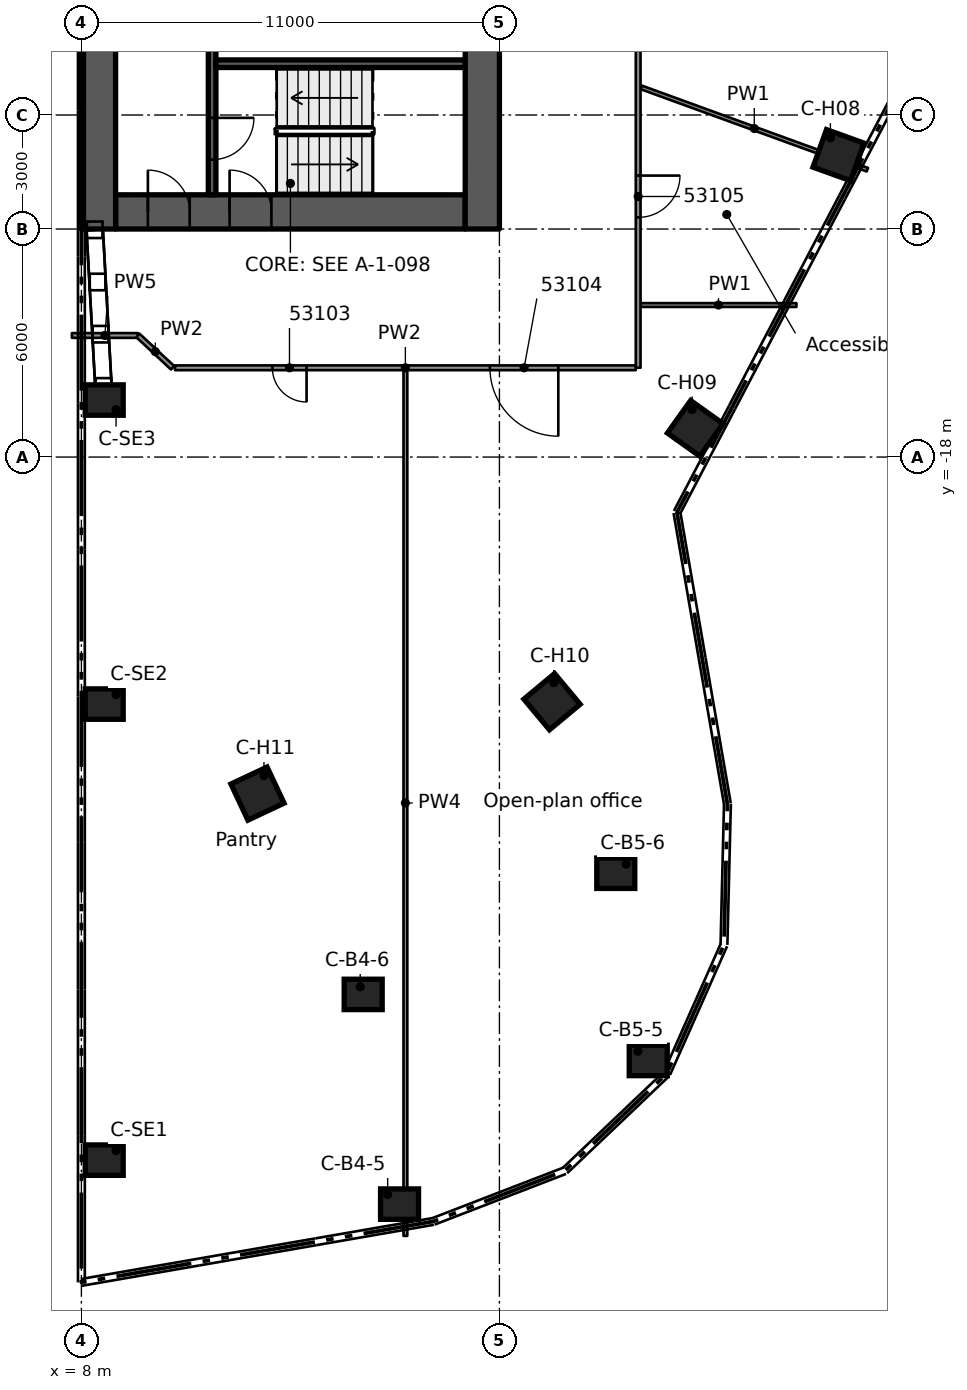
"""IFC4 building model, lengths in metres.
Left out: names, types, materials, properties, quantities, classifications, styles, units other than length and angle.
Written with IfcOpenShell. Run it as: python <this file> out.ifc"""

import sys

from ifc_helpers import new_model, si_unit, direction, frame, frame_2d, origin, origin_2d, place, context, subcontext, project, spatial, rectangle, extrude, element, fill, save


model = new_model("IFC4")
c1 = context("Model", 3, precision=1e-05, world=origin(), true_north=direction((0.0, 1.0)))
c2 = subcontext(c1, "Body", "Model", "MODEL_VIEW")
j1 = project(units=[si_unit("LENGTHUNIT", "METRE"), si_unit("PLANEANGLEUNIT", "RADIAN")], contexts=[c1])
p1 = place(None, origin())
s1 = spatial("IfcSite", under=j1, at=p1, CompositionType="ELEMENT")
p2 = place(p1, origin())
s2 = spatial("IfcBuilding", under=s1, at=p2, CompositionType="ELEMENT")
p3 = place(p2, frame((0.0, 0.0, 267.5)))
s3 = spatial("IfcBuildingStorey", under=s2, at=p3, CompositionType="ELEMENT", Elevation=267.5)
p4 = place(p3, frame((8.9, -11.55, 0.0), z_axis=(0.0, 0.0, 1.0), x_axis=(1.0, 0.0, 0.0)))
e1 = element("IfcWall", 1, at=p4, inside=s3, PredefinedType="SHEAR", context=c2, shape_type="SweptSolid", body=[
    extrude(rectangle(XDim=9.2, YDim=0.9, at=frame_2d((4.6, 0.0))), origin(), (0.0, 0.0, 1.0), 3.5),
])
p5 = place(p4, frame((0.85, 0.0, 0.0)))
e2 = element("IfcOpeningElement", 2, at=p5, cuts=e1, PredefinedType="OPENING", context=c2, shape_type="SweptSolid", body=[
    extrude(rectangle(XDim=1.1, YDim=2.1, at=frame_2d((0.55, 1.05))), frame((0.0, 0.46, 0.0), z_axis=(0.0, -1.0, 0.0), x_axis=(1.0, 0.0, 0.0)), (0.0, 0.0, 1.0), 0.92),
])
p6 = place(p4, frame((3.0, 0.0, 0.0)))
e3 = element("IfcOpeningElement", 3, at=p6, cuts=e1, PredefinedType="OPENING", context=c2, shape_type="SweptSolid", body=[
    extrude(rectangle(XDim=1.1, YDim=2.1, at=frame_2d((0.55, 1.05))), frame((0.0, 0.46, 0.0), z_axis=(0.0, -1.0, 0.0), x_axis=(1.0, 0.0, 0.0)), (0.0, 0.0, 1.0), 0.92),
])
p7 = place(p3, frame((8.45, -12.0, 0.0), z_axis=(0.0, 0.0, 1.0), x_axis=(0.0, 1.0, 0.0)))
e4 = element("IfcWall", 4, at=p7, inside=s3, PredefinedType="SHEAR", context=c2, shape_type="SweptSolid", body=[
    extrude(rectangle(XDim=24.0, YDim=0.9, at=frame_2d((12.0, 0.0))), origin(), (0.0, 0.0, 1.0), 3.5),
])
p8 = place(p3, frame((18.55, -12.0, 0.0), z_axis=(0.0, 0.0, 1.0), x_axis=(0.0, 1.0, 0.0)))
e5 = element("IfcWall", 5, at=p8, inside=s3, PredefinedType="SHEAR", context=c2, shape_type="SweptSolid", body=[
    extrude(rectangle(XDim=24.0, YDim=0.9, at=frame_2d((12.0, 0.0))), origin(), (0.0, 0.0, 1.0), 3.5),
])
p9 = place(p8, frame((12.1, 0.0, 0.0)))
e6 = element("IfcOpeningElement", 6, at=p9, cuts=e5, PredefinedType="OPENING", context=c2, shape_type="SweptSolid", body=[
    extrude(rectangle(XDim=1.8, YDim=2.1, at=frame_2d((0.9, 1.05))), frame((0.0, 0.46, 0.0), z_axis=(0.0, -1.0, 0.0), x_axis=(1.0, 0.0, 0.0)), (0.0, 0.0, 1.0), 0.92),
])
for number, where, z_axis, x_axis in (
    (7, (16.372, -37.657, 0.0), (0.0, 0.0, 1.0), (1.0, 0.0, 0.0)),
    (8, (15.415, -32.139, 0.0), (0.0, 0.0, 1.0), (1.0, 0.0, 0.0)),
    (9, (22.916, -33.877, 0.0), (0.0, 0.0, 1.0), (1.0, 0.0, 0.0)),
    (10, (22.062, -28.951, 0.0), (0.0, 0.0, 1.0), (1.0, 0.0, 0.0)),
):
    element("IfcColumn", number, at=place(p3, frame(where, z_axis=z_axis, x_axis=x_axis)), inside=s3, PredefinedType="COLUMN", context=c2, shape_type="SweptSolid", body=[
        extrude(rectangle(XDim=1.0, YDim=0.8, at=origin_2d()), origin(), (0.0, 0.0, 1.0), 3.5),
    ])
for number, where, z_axis, x_axis in (
    (11, (27.923, -10.056, 0.0), (0.0, 0.0, 1.0), (0.941, -0.339, 0.0)),
    (12, (24.154, -17.246, 0.0), (0.0, 0.0, 1.0), (0.814, -0.581, 0.0)),
    (13, (20.384, -24.437, 0.0), (0.0, 0.0, 1.0), (0.641, -0.768, 0.0)),
    (14, (12.634, -26.855, 0.0), (0.0, 0.0, 1.0), (0.426, -0.905, 0.0)),
):
    element("IfcColumn", number, at=place(p3, frame(where, z_axis=z_axis, x_axis=x_axis)), inside=s3, PredefinedType="COLUMN", context=c2, shape_type="SweptSolid", body=[
        extrude(rectangle(XDim=1.05, YDim=1.05, at=origin_2d()), origin(), (0.0, 0.0, 1.0), 3.5),
    ])
for number, where, z_axis, x_axis in (
    (15, (8.6, -36.5, 0.0), (0.0, 0.0, 1.0), (1.0, 0.0, 0.0)),
    (16, (8.6, -24.5, 0.0), (0.0, 0.0, 1.0), (1.0, 0.0, 0.0)),
    (17, (8.6, -16.5, 0.0), (0.0, 0.0, 1.0), (1.0, 0.0, 0.0)),
):
    element("IfcColumn", number, at=place(p3, frame(where, z_axis=z_axis, x_axis=x_axis)), inside=s3, PredefinedType="COLUMN", context=c2, shape_type="SweptSolid", body=[
        extrude(rectangle(XDim=1.0, YDim=0.8, at=origin_2d()), origin(), (0.0, 0.0, 1.0), 3.5),
    ])
p10 = place(p3, frame((11.44, -6.975, 0.0), z_axis=(0.0, 0.0, 1.0), x_axis=(0.0, -1.0, 0.0)))
e18 = element("IfcWall", 18, at=p10, inside=s3, PredefinedType="SOLIDWALL", context=c2, shape_type="SweptSolid", body=[
    extrude(rectangle(XDim=4.125, YDim=0.2, at=frame_2d((2.062, 0.0))), origin(), (0.0, 0.0, 1.0), 3.05),
])
p11 = place(p10, frame((2.1, 0.0, 0.0)))
e19 = element("IfcOpeningElement", 19, at=p11, cuts=e18, PredefinedType="OPENING", context=c2, shape_type="SweptSolid", body=[
    extrude(rectangle(XDim=1.1, YDim=2.1, at=frame_2d((0.55, 1.05))), frame((0.0, 0.11, 0.0), z_axis=(0.0, -1.0, 0.0), x_axis=(1.0, 0.0, 0.0)), (0.0, 0.0, 1.0), 0.22),
])
p12 = place(p3, frame((11.54, -7.65, 0.0), z_axis=(0.0, 0.0, 1.0), x_axis=(1.0, 0.0, 0.0)))
e20 = element("IfcWall", 20, at=p12, inside=s3, PredefinedType="SOLIDWALL", context=c2, shape_type="SweptSolid", body=[
    extrude(rectangle(XDim=6.56, YDim=0.2, at=frame_2d((3.28, 0.0))), origin(), (0.0, 0.0, 1.0), 3.05),
])
p13 = place(p3, frame((22.731, -8.273, 0.0), z_axis=(0.0, 0.0, 1.0), x_axis=(0.939689826278, -0.342027821076, 0.0)))
e21 = element("IfcWall", 21, at=p13, inside=s3, PredefinedType="PARTITIONING", context=c2, shape_type="SweptSolid", body=[
    extrude(rectangle(XDim=6.333, YDim=0.1, at=frame_2d((3.167, 0.0))), origin(), (0.0, 0.0, 1.0), 3.03),
])
p14 = place(p3, frame((22.587, -15.651, 0.0), z_axis=(0.0, 0.0, 1.0), x_axis=(-1.0, 0.0, 0.0)))
e22 = element("IfcWall", 22, at=p14, inside=s3, PredefinedType="PARTITIONING", context=c2, shape_type="SweptSolid", body=[
    extrude(rectangle(XDim=12.124, YDim=0.125, at=frame_2d((6.062, 0.0))), origin(), (0.0, 0.0, 1.0), 3.03),
])
p15 = place(p14, frame((8.662, 0.0, 0.0)))
e23 = element("IfcOpeningElement", 23, at=p15, cuts=e22, PredefinedType="OPENING", context=c2, shape_type="SweptSolid", body=[
    extrude(rectangle(XDim=0.9, YDim=2.1, at=frame_2d((0.45, 1.05))), frame((0.0, 0.073, 0.0), z_axis=(0.0, -1.0, 0.0), x_axis=(1.0, 0.0, 0.0)), (0.0, 0.0, 1.0), 0.145),
])
p16 = place(p14, frame((2.038, 0.0, 0.0)))
e24 = element("IfcOpeningElement", 24, at=p16, cuts=e22, PredefinedType="OPENING", context=c2, shape_type="SweptSolid", body=[
    extrude(rectangle(XDim=1.8, YDim=2.1, at=frame_2d((0.9, 1.05))), frame((0.0, 0.073, 0.0), z_axis=(0.0, -1.0, 0.0), x_axis=(1.0, 0.0, 0.0)), (0.0, 0.0, 1.0), 0.145),
])
p17 = place(p3, frame((7.75, -14.801, 0.0), z_axis=(0.0, 0.0, 1.0), x_axis=(1.0, 0.0, 0.0)))
e25 = element("IfcWall", 25, at=p17, inside=s3, PredefinedType="PARTITIONING", context=c2, shape_type="SweptSolid", body=[
    extrude(rectangle(XDim=1.738, YDim=0.125, at=frame_2d((0.869, 0.0))), origin(), (0.0, 0.0, 1.0), 2.496),
])
p18 = place(p3, frame((22.713, -14.0, 0.0), z_axis=(0.0, 0.0, 1.0), x_axis=(1.0, 0.0, 0.0)))
e26 = element("IfcWall", 26, at=p18, inside=s3, PredefinedType="PARTITIONING", context=c2, shape_type="SweptSolid", body=[
    extrude(rectangle(XDim=4.102, YDim=0.1, at=frame_2d((2.051, 0.0))), origin(), (0.0, 0.0, 1.0), 3.03),
])
p19 = place(p3, frame((22.651, 15.65, 0.0), z_axis=(0.0, 0.0, 1.0), x_axis=(0.0, -1.0, 0.0)))
e27 = element("IfcWall", 27, at=p19, inside=s3, PredefinedType="PARTITIONING", context=c2, shape_type="SweptSolid", body=[
    extrude(rectangle(XDim=31.3, YDim=0.125, at=frame_2d((15.65, 0.0))), origin(), (0.0, 0.0, 1.0), 3.03),
])
p20 = place(p19, frame((26.244, 0.0, 0.0)))
e28 = element("IfcOpeningElement", 28, at=p20, cuts=e27, PredefinedType="OPENING", context=c2, shape_type="SweptSolid", body=[
    extrude(rectangle(XDim=1.1, YDim=2.1, at=frame_2d((0.55, 1.05))), frame((0.0, 0.073, 0.0), z_axis=(0.0, -1.0, 0.0), x_axis=(1.0, 0.0, 0.0)), (0.0, 0.0, 1.0), 0.145),
])
p21 = place(p19, frame((19.25, 0.0, 0.0)))
e29 = element("IfcOpeningElement", 29, at=p21, cuts=e27, PredefinedType="OPENING", context=c2, shape_type="SweptSolid", body=[
    extrude(rectangle(XDim=0.9, YDim=2.1, at=frame_2d((0.45, 1.05))), frame((0.0, 0.073, 0.0), z_axis=(0.0, -1.0, 0.0), x_axis=(1.0, 0.0, 0.0)), (0.0, 0.0, 1.0), 0.145),
])
p22 = place(p19, frame((11.006, 0.0, 0.0)))
e30 = element("IfcOpeningElement", 30, at=p22, cuts=e27, PredefinedType="OPENING", context=c2, shape_type="SweptSolid", body=[
    extrude(rectangle(XDim=0.9, YDim=2.1, at=frame_2d((0.45, 1.05))), frame((0.0, 0.073, 0.0), z_axis=(0.0, -1.0, 0.0), x_axis=(1.0, 0.0, 0.0)), (0.0, 0.0, 1.0), 0.145),
])
p23 = place(p19, frame((4.0, 0.0, 0.0)))
e31 = element("IfcOpeningElement", 31, at=p23, cuts=e27, PredefinedType="OPENING", context=c2, shape_type="SweptSolid", body=[
    extrude(rectangle(XDim=0.9, YDim=2.1, at=frame_2d((0.45, 1.05))), frame((0.0, 0.073, 0.0), z_axis=(0.0, -1.0, 0.0), x_axis=(1.0, 0.0, 0.0)), (0.0, 0.0, 1.0), 0.145),
])
p24 = place(p3, frame((16.526, -38.493, 0.0), z_axis=(0.0, 0.0, 1.0), x_axis=(0.0, 1.0, 0.0)))
e32 = element("IfcWall", 32, at=p24, inside=s3, PredefinedType="PARTITIONING", context=c2, shape_type="SweptSolid", body=[
    extrude(rectangle(XDim=22.78, YDim=0.1, at=frame_2d((11.39, 0.0))), origin(), (0.0, 0.0, 1.0), 2.419),
])
p25 = place(p3, frame((10.4, -15.651, 0.0), z_axis=(0.0, 0.0, 1.0), x_axis=(-0.731543572148, 0.681794692007, 0.0)))
e33 = element("IfcWall", 33, at=p25, inside=s3, PredefinedType="PARTITIONING", context=c2, shape_type="SweptSolid", body=[
    extrude(rectangle(XDim=1.247, YDim=0.125, at=frame_2d((0.623, 0.0))), origin(), (0.0, 0.0, 1.0), 3.03),
])
p26 = place(p5, origin())
e34 = element("IfcDoor", 34, at=p26, inside=s3, OperationType="SINGLE_SWING_LEFT", PredefinedType="DOOR", context=c2, shape_type="SweptSolid", body=[
    extrude(rectangle(XDim=1.1, YDim=2.1, at=frame_2d((0.55, 1.05))), frame((0.0, 0.025, 0.0), z_axis=(0.0, -1.0, 0.0), x_axis=(1.0, 0.0, 0.0)), (0.0, 0.0, 1.0), 0.05),
])
fill(e2, e34)
p27 = place(p6, origin())
e35 = element("IfcDoor", 35, at=p27, inside=s3, OperationType="SINGLE_SWING_LEFT", PredefinedType="DOOR", context=c2, shape_type="SweptSolid", body=[
    extrude(rectangle(XDim=1.1, YDim=2.1, at=frame_2d((0.55, 1.05))), frame((0.0, 0.025, 0.0), z_axis=(0.0, -1.0, 0.0), x_axis=(1.0, 0.0, 0.0)), (0.0, 0.0, 1.0), 0.05),
])
fill(e3, e35)
p28 = place(p11, origin())
e36 = element("IfcDoor", 36, at=p28, inside=s3, OperationType="SINGLE_SWING_RIGHT", PredefinedType="DOOR", context=c2, shape_type="SweptSolid", body=[
    extrude(rectangle(XDim=1.1, YDim=2.1, at=frame_2d((0.55, 1.05))), frame((0.0, 0.025, 0.0), z_axis=(0.0, -1.0, 0.0), x_axis=(1.0, 0.0, 0.0)), (0.0, 0.0, 1.0), 0.05),
])
fill(e19, e36)
p29 = place(p15, origin())
e37 = element("IfcDoor", 37, at=p29, inside=s3, OperationType="SINGLE_SWING_RIGHT", PredefinedType="DOOR", context=c2, shape_type="SweptSolid", body=[
    extrude(rectangle(XDim=0.9, YDim=2.1, at=frame_2d((0.45, 1.05))), frame((0.0, 0.025, 0.0), z_axis=(0.0, -1.0, 0.0), x_axis=(1.0, 0.0, 0.0)), (0.0, 0.0, 1.0), 0.05),
])
fill(e23, e37)
p30 = place(p16, origin())
e38 = element("IfcDoor", 38, at=p30, inside=s3, OperationType="DOUBLE_DOOR_SINGLE_SWING", PredefinedType="DOOR", context=c2, shape_type="SweptSolid", body=[
    extrude(rectangle(XDim=1.8, YDim=2.1, at=frame_2d((0.9, 1.05))), frame((0.0, 0.025, 0.0), z_axis=(0.0, -1.0, 0.0), x_axis=(1.0, 0.0, 0.0)), (0.0, 0.0, 1.0), 0.05),
])
fill(e24, e38)
p31 = place(p20, origin())
e39 = element("IfcDoor", 39, at=p31, inside=s3, OperationType="SINGLE_SWING_RIGHT", PredefinedType="DOOR", context=c2, shape_type="SweptSolid", body=[
    extrude(rectangle(XDim=1.1, YDim=2.1, at=frame_2d((0.55, 1.05))), frame((0.0, 0.025, 0.0), z_axis=(0.0, -1.0, 0.0), x_axis=(1.0, 0.0, 0.0)), (0.0, 0.0, 1.0), 0.05),
])
fill(e28, e39)
save(model, sys.argv[1])
